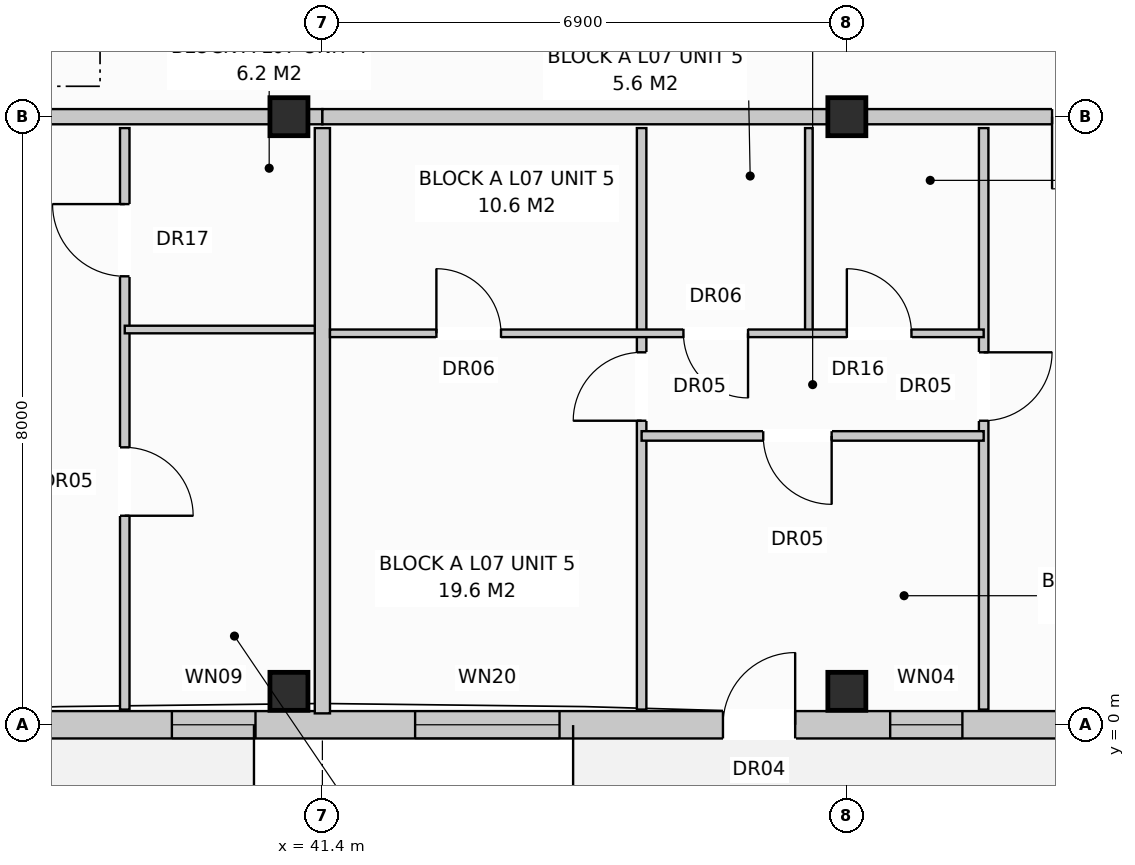
"""IFC4 building model, lengths in metres.
Left out: names, types, materials, properties, quantities, classifications, styles, units other than length and angle.
Written with IfcOpenShell. Run it as: python <this file> out.ifc"""

import sys

from ifc_helpers import new_model, si_unit, direction, frame, frame_2d, origin, origin_with_axes, origin_2d, place, context, subcontext, project, spatial, rectangle, extrude, element, fill, save


model = new_model("IFC4")
c1 = context("Model", 3, precision=1e-05, world=origin(), true_north=direction((0.0, 1.0)))
c2 = subcontext(c1, "Body", "Model", "MODEL_VIEW")
j1 = project(units=[si_unit("LENGTHUNIT", "METRE"), si_unit("PLANEANGLEUNIT", "RADIAN")], contexts=[c1])
p1 = place(None, origin())
s1 = spatial("IfcSite", under=j1, at=p1, CompositionType="ELEMENT")
p2 = place(p1, origin())
s2 = spatial("IfcBuilding", under=s1, at=p2, CompositionType="ELEMENT")
p3 = place(p2, frame((0.0, 0.0, 24.0)))
s3 = spatial("IfcBuildingStorey", under=s2, at=p3, CompositionType="ELEMENT", Elevation=24.0)
for number, where, z_axis, x_axis in (
    (1, (40.96, 0.44, 0.0), (0.0, 0.0, 1.0), (1.0, 0.0, 0.0)),
    (2, (40.96, 8.0, 0.0), (0.0, 0.0, 1.0), (1.0, 0.0, 0.0)),
    (3, (48.3, 0.44, 0.0), (0.0, 0.0, 1.0), (1.0, 0.0, 0.0)),
    (4, (48.3, 8.0, 0.0), (0.0, 0.0, 1.0), (1.0, 0.0, 0.0)),
):
    element("IfcColumn", number, at=place(p3, frame(where, z_axis=z_axis, x_axis=x_axis)), inside=s3, PredefinedType="COLUMN", context=c2, shape_type="SweptSolid", body=[
        extrude(rectangle(XDim=0.5, YDim=0.5, at=origin_2d()), origin(), (0.0, 0.0, 1.0), 3.2),
    ])
p4 = place(p3, frame((0.17, 0.0, 0.0), z_axis=(0.0, 0.0, 1.0), x_axis=(1.0, 0.0, 0.0)))
e5 = element("IfcWall", 5, at=p4, inside=s3, PredefinedType="STANDARD", context=c2, shape_type="SweptSolid", body=[
    extrude(rectangle(XDim=54.86, YDim=0.36, at=frame_2d((27.43, 0.0))), origin(), (0.0, 0.0, 1.0), 2.95),
])
p5 = place(p4, frame((2.5, 0.0, 0.0)))
e6 = element("IfcOpeningElement", 6, at=p5, cuts=e5, PredefinedType="OPENING", context=c2, shape_type="SweptSolid", body=[
    extrude(rectangle(XDim=0.95, YDim=2.1, at=frame_2d((0.475, 1.05))), frame((0.0, 0.192, 0.0), z_axis=(0.0, -1.0, 0.0), x_axis=(1.0, 0.0, 0.0)), (0.0, 0.0, 1.0), 0.384),
])
p6 = place(p4, frame((17.0, 0.0, 0.0)))
e7 = element("IfcOpeningElement", 7, at=p6, cuts=e5, PredefinedType="OPENING", context=c2, shape_type="SweptSolid", body=[
    extrude(rectangle(XDim=0.95, YDim=2.1, at=frame_2d((0.475, 1.05))), frame((0.0, 0.192, 0.0), z_axis=(0.0, -1.0, 0.0), x_axis=(1.0, 0.0, 0.0)), (0.0, 0.0, 1.0), 0.384),
])
p7 = place(p4, frame((30.1, 0.0, 0.0)))
e8 = element("IfcOpeningElement", 8, at=p7, cuts=e5, PredefinedType="OPENING", context=c2, shape_type="SweptSolid", body=[
    extrude(rectangle(XDim=0.95, YDim=2.1, at=frame_2d((0.475, 1.05))), frame((0.0, 0.192, 0.0), z_axis=(0.0, -1.0, 0.0), x_axis=(1.0, 0.0, 0.0)), (0.0, 0.0, 1.0), 0.384),
])
p8 = place(p4, frame((46.5, 0.0, 0.0)))
e9 = element("IfcOpeningElement", 9, at=p8, cuts=e5, PredefinedType="OPENING", context=c2, shape_type="SweptSolid", body=[
    extrude(rectangle(XDim=0.95, YDim=2.1, at=frame_2d((0.475, 1.05))), frame((0.0, 0.192, 0.0), z_axis=(0.0, -1.0, 0.0), x_axis=(1.0, 0.0, 0.0)), (0.0, 0.0, 1.0), 0.384),
])
p9 = place(p4, frame((0.75, 0.0, 0.72)))
e10 = element("IfcOpeningElement", 10, at=p9, cuts=e5, PredefinedType="OPENING", context=c2, shape_type="SweptSolid", body=[
    extrude(rectangle(XDim=1.1, YDim=1.5, at=frame_2d((0.55, 0.75))), frame((0.0, 0.192, 0.0), z_axis=(0.0, -1.0, 0.0), x_axis=(1.0, 0.0, 0.0)), (0.0, 0.0, 1.0), 0.384),
])
p10 = place(p4, frame((4.25, 0.0, 0.72)))
e11 = element("IfcOpeningElement", 11, at=p10, cuts=e5, PredefinedType="OPENING", context=c2, shape_type="SweptSolid", body=[
    extrude(rectangle(XDim=1.9, YDim=1.85, at=frame_2d((0.95, 0.925))), frame((0.0, 0.192, 0.0), z_axis=(0.0, -1.0, 0.0), x_axis=(1.0, 0.0, 0.0)), (0.0, 0.0, 1.0), 0.384),
])
p11 = place(p4, frame((8.925, 0.0, 0.8)))
e12 = element("IfcOpeningElement", 12, at=p11, cuts=e5, PredefinedType="OPENING", context=c2, shape_type="SweptSolid", body=[
    extrude(rectangle(XDim=1.95, YDim=1.65, at=frame_2d((0.975, 0.825))), frame((0.0, 0.192, 0.0), z_axis=(0.0, -1.0, 0.0), x_axis=(1.0, 0.0, 0.0)), (0.0, 0.0, 1.0), 0.384),
])
p12 = place(p4, frame((15.05, 0.0, 0.72)))
e13 = element("IfcOpeningElement", 13, at=p12, cuts=e5, PredefinedType="OPENING", context=c2, shape_type="SweptSolid", body=[
    extrude(rectangle(XDim=1.1, YDim=1.5, at=frame_2d((0.55, 0.75))), frame((0.0, 0.192, 0.0), z_axis=(0.0, -1.0, 0.0), x_axis=(1.0, 0.0, 0.0)), (0.0, 0.0, 1.0), 0.384),
])
p13 = place(p4, frame((21.05, 0.0, 0.72)))
e14 = element("IfcOpeningElement", 14, at=p13, cuts=e5, PredefinedType="OPENING", context=c2, shape_type="SweptSolid", body=[
    extrude(rectangle(XDim=1.9, YDim=1.85, at=frame_2d((0.95, 0.925))), frame((0.0, 0.192, 0.0), z_axis=(0.0, -1.0, 0.0), x_axis=(1.0, 0.0, 0.0)), (0.0, 0.0, 1.0), 0.384),
])
p14 = place(p4, frame((24.85, 0.0, 0.72)))
e15 = element("IfcOpeningElement", 15, at=p14, cuts=e5, PredefinedType="OPENING", context=c2, shape_type="SweptSolid", body=[
    extrude(rectangle(XDim=1.1, YDim=1.5, at=frame_2d((0.55, 0.75))), frame((0.0, 0.192, 0.0), z_axis=(0.0, -1.0, 0.0), x_axis=(1.0, 0.0, 0.0)), (0.0, 0.0, 1.0), 0.384),
])
p15 = place(p4, frame((28.35, 0.0, 0.72)))
e16 = element("IfcOpeningElement", 16, at=p15, cuts=e5, PredefinedType="OPENING", context=c2, shape_type="SweptSolid", body=[
    extrude(rectangle(XDim=1.1, YDim=1.5, at=frame_2d((0.55, 0.75))), frame((0.0, 0.192, 0.0), z_axis=(0.0, -1.0, 0.0), x_axis=(1.0, 0.0, 0.0)), (0.0, 0.0, 1.0), 0.384),
])
p16 = place(p4, frame((31.85, 0.0, 0.72)))
e17 = element("IfcOpeningElement", 17, at=p16, cuts=e5, PredefinedType="OPENING", context=c2, shape_type="SweptSolid", body=[
    extrude(rectangle(XDim=1.9, YDim=1.85, at=frame_2d((0.95, 0.925))), frame((0.0, 0.192, 0.0), z_axis=(0.0, -1.0, 0.0), x_axis=(1.0, 0.0, 0.0)), (0.0, 0.0, 1.0), 0.384),
])
p17 = place(p4, frame((35.525, 0.0, 0.8)))
e18 = element("IfcOpeningElement", 18, at=p17, cuts=e5, PredefinedType="OPENING", context=c2, shape_type="SweptSolid", body=[
    extrude(rectangle(XDim=1.95, YDim=1.65, at=frame_2d((0.975, 0.825))), frame((0.0, 0.192, 0.0), z_axis=(0.0, -1.0, 0.0), x_axis=(1.0, 0.0, 0.0)), (0.0, 0.0, 1.0), 0.384),
])
p18 = place(p4, frame((39.25, 0.0, 0.72)))
e19 = element("IfcOpeningElement", 19, at=p18, cuts=e5, PredefinedType="OPENING", context=c2, shape_type="SweptSolid", body=[
    extrude(rectangle(XDim=1.1, YDim=1.5, at=frame_2d((0.55, 0.75))), frame((0.0, 0.192, 0.0), z_axis=(0.0, -1.0, 0.0), x_axis=(1.0, 0.0, 0.0)), (0.0, 0.0, 1.0), 0.384),
])
p19 = place(p4, frame((42.45, 0.0, 0.8)))
e20 = element("IfcOpeningElement", 20, at=p19, cuts=e5, PredefinedType="OPENING", context=c2, shape_type="SweptSolid", body=[
    extrude(rectangle(XDim=1.9, YDim=1.85, at=frame_2d((0.95, 0.925))), frame((0.0, 0.192, 0.0), z_axis=(0.0, -1.0, 0.0), x_axis=(1.0, 0.0, 0.0)), (0.0, 0.0, 1.0), 0.384),
])
p20 = place(p4, frame((48.7, 0.0, 0.9)))
e21 = element("IfcOpeningElement", 21, at=p20, cuts=e5, PredefinedType="OPENING", context=c2, shape_type="SweptSolid", body=[
    extrude(rectangle(XDim=0.95, YDim=1.55, at=frame_2d((0.475, 0.775))), frame((0.0, 0.192, 0.0), z_axis=(0.0, -1.0, 0.0), x_axis=(1.0, 0.0, 0.0)), (0.0, 0.0, 1.0), 0.384),
])
p21 = place(p4, frame((51.5, 0.0, 0.8)))
e22 = element("IfcOpeningElement", 22, at=p21, cuts=e5, PredefinedType="OPENING", context=c2, shape_type="SweptSolid", body=[
    extrude(rectangle(XDim=1.8, YDim=1.7, at=frame_2d((0.9, 0.85))), frame((0.0, 0.192, 0.0), z_axis=(0.0, -1.0, 0.0), x_axis=(1.0, 0.0, 0.0)), (0.0, 0.0, 1.0), 0.384),
])
p22 = place(p3, frame((41.4, 7.85, 0.0), z_axis=(0.0, 0.0, 1.0), x_axis=(0.0, -1.0, 0.0)))
e23 = element("IfcWall", 23, at=p22, inside=s3, PredefinedType="PARTITIONING", context=c2, shape_type="SweptSolid", body=[
    extrude(rectangle(XDim=7.7, YDim=0.2, at=frame_2d((3.85, 0.0))), origin(), (0.0, 0.0, 1.0), 2.95),
])
p23 = place(p3, frame((34.5, 8.0, 0.0), z_axis=(0.0, 0.0, 1.0), x_axis=(1.0, 0.0, 0.0)))
e24 = element("IfcWall", 24, at=p23, inside=s3, PredefinedType="PARTITIONING", context=c2, shape_type="SweptSolid", body=[
    extrude(rectangle(XDim=6.9, YDim=0.2, at=frame_2d((3.45, 0.0))), origin(), (0.0, 0.0, 1.0), 2.39),
])
p24 = place(p23, frame((2.0, 0.0, 0.0)))
e25 = element("IfcOpeningElement", 25, at=p24, cuts=e24, PredefinedType="OPENING", context=c2, shape_type="SweptSolid", body=[
    extrude(rectangle(XDim=0.95, YDim=2.15, at=frame_2d((0.475, 1.075))), frame((0.0, 0.112, 0.0), z_axis=(0.0, -1.0, 0.0), x_axis=(1.0, 0.0, 0.0)), (0.0, 0.0, 1.0), 0.224),
])
p25 = place(p3, frame((38.8, 7.85, 0.0), z_axis=(0.0, 0.0, 1.0), x_axis=(0.0, -1.0, 0.0)))
e26 = element("IfcWall", 26, at=p25, inside=s3, PredefinedType="PARTITIONING", context=c2, shape_type="SweptSolid", body=[
    extrude(rectangle(XDim=7.65, YDim=0.125, at=frame_2d((3.825, 0.0))), origin(), (0.0, 0.0, 1.0), 2.95),
])
p26 = place(p25, frame((1.0, 0.0, 0.0)))
e27 = element("IfcOpeningElement", 27, at=p26, cuts=e26, PredefinedType="OPENING", context=c2, shape_type="SweptSolid", body=[
    extrude(rectangle(XDim=0.95, YDim=2.1, at=frame_2d((0.475, 1.05))), frame((0.0, 0.074, 0.0), z_axis=(0.0, -1.0, 0.0), x_axis=(1.0, 0.0, 0.0)), (0.0, 0.0, 1.0), 0.149),
])
p27 = place(p25, frame((4.2, 0.0, 0.0)))
e28 = element("IfcOpeningElement", 28, at=p27, cuts=e26, PredefinedType="OPENING", context=c2, shape_type="SweptSolid", body=[
    extrude(rectangle(XDim=0.9, YDim=2.1, at=frame_2d((0.45, 1.05))), frame((0.0, 0.074, 0.0), z_axis=(0.0, -1.0, 0.0), x_axis=(1.0, 0.0, 0.0)), (0.0, 0.0, 1.0), 0.149),
])
p28 = place(p3, frame((38.8, 5.2, 0.0), z_axis=(0.0, 0.0, 1.0), x_axis=(1.0, 0.0, 0.0)))
e29 = element("IfcWall", 29, at=p28, inside=s3, PredefinedType="PARTITIONING", context=c2, shape_type="SweptSolid", body=[
    extrude(rectangle(XDim=2.5, YDim=0.1, at=frame_2d((1.25, 0.0))), origin(), (0.0, 0.0, 1.0), 2.95),
])
p29 = place(p3, frame((41.4, 8.0, 0.0), z_axis=(0.0, 0.0, 1.0), x_axis=(1.0, 0.0, 0.0)))
e30 = element("IfcWall", 30, at=p29, inside=s3, PredefinedType="PARTITIONING", context=c2, shape_type="SweptSolid", body=[
    extrude(rectangle(XDim=13.8, YDim=0.2, at=frame_2d((6.9, 0.0))), origin(), (0.0, 0.0, 1.0), 2.39),
])
p30 = place(p29, frame((9.6, 0.0, 0.0)))
e31 = element("IfcOpeningElement", 31, at=p30, cuts=e30, PredefinedType="OPENING", context=c2, shape_type="SweptSolid", body=[
    extrude(rectangle(XDim=0.95, YDim=2.15, at=frame_2d((0.475, 1.075))), frame((0.0, 0.112, 0.0), z_axis=(0.0, -1.0, 0.0), x_axis=(1.0, 0.0, 0.0)), (0.0, 0.0, 1.0), 0.224),
])
p31 = place(p3, frame((50.1, 7.85, 0.0), z_axis=(0.0, 0.0, 1.0), x_axis=(0.0, -1.0, 0.0)))
e32 = element("IfcWall", 32, at=p31, inside=s3, PredefinedType="PARTITIONING", context=c2, shape_type="SweptSolid", body=[
    extrude(rectangle(XDim=7.65, YDim=0.125, at=frame_2d((3.825, 0.0))), origin(), (0.0, 0.0, 1.0), 2.95),
])
p32 = place(p31, frame((2.95, 0.0, 0.0)))
e33 = element("IfcOpeningElement", 33, at=p32, cuts=e32, PredefinedType="OPENING", context=c2, shape_type="SweptSolid", body=[
    extrude(rectangle(XDim=0.9, YDim=2.1, at=frame_2d((0.45, 1.05))), frame((0.0, 0.074, 0.0), z_axis=(0.0, -1.0, 0.0), x_axis=(1.0, 0.0, 0.0)), (0.0, 0.0, 1.0), 0.149),
])
p33 = place(p3, frame((45.6, 7.85, 0.0), z_axis=(0.0, 0.0, 1.0), x_axis=(0.0, -1.0, 0.0)))
e34 = element("IfcWall", 34, at=p33, inside=s3, PredefinedType="PARTITIONING", context=c2, shape_type="SweptSolid", body=[
    extrude(rectangle(XDim=7.65, YDim=0.125, at=frame_2d((3.825, 0.0))), origin(), (0.0, 0.0, 1.0), 2.59),
])
p34 = place(p33, frame((2.95, 0.0, 0.0)))
e35 = element("IfcOpeningElement", 35, at=p34, cuts=e34, PredefinedType="OPENING", context=c2, shape_type="SweptSolid", body=[
    extrude(rectangle(XDim=0.9, YDim=2.1, at=frame_2d((0.45, 1.05))), frame((0.0, 0.074, 0.0), z_axis=(0.0, -1.0, 0.0), x_axis=(1.0, 0.0, 0.0)), (0.0, 0.0, 1.0), 0.149),
])
p35 = place(p3, frame((47.8, 7.85, 0.0), z_axis=(0.0, 0.0, 1.0), x_axis=(0.0, -1.0, 0.0)))
e36 = element("IfcWall", 36, at=p35, inside=s3, PredefinedType="PARTITIONING", context=c2, shape_type="SweptSolid", body=[
    extrude(rectangle(XDim=2.7, YDim=0.1, at=frame_2d((1.35, 0.0))), origin(), (0.0, 0.0, 1.0), 2.95),
])
p36 = place(p3, frame((41.5, 5.15, 0.0), z_axis=(0.0, 0.0, 1.0), x_axis=(1.0, 0.0, 0.0)))
e37 = element("IfcWall", 37, at=p36, inside=s3, PredefinedType="PARTITIONING", context=c2, shape_type="SweptSolid", body=[
    extrude(rectangle(XDim=8.6, YDim=0.1, at=frame_2d((4.3, 0.0))), origin(), (0.0, 0.0, 1.0), 2.95),
])
p37 = place(p36, frame((1.4, 0.0, 0.0)))
e38 = element("IfcOpeningElement", 38, at=p37, cuts=e37, PredefinedType="OPENING", context=c2, shape_type="SweptSolid", body=[
    extrude(rectangle(XDim=0.85, YDim=2.05, at=frame_2d((0.425, 1.025))), frame((0.0, 0.062, 0.0), z_axis=(0.0, -1.0, 0.0), x_axis=(1.0, 0.0, 0.0)), (0.0, 0.0, 1.0), 0.124),
])
p38 = place(p36, frame((4.65, 0.0, 0.0)))
e39 = element("IfcOpeningElement", 39, at=p38, cuts=e37, PredefinedType="OPENING", context=c2, shape_type="SweptSolid", body=[
    extrude(rectangle(XDim=0.85, YDim=2.05, at=frame_2d((0.425, 1.025))), frame((0.0, 0.062, 0.0), z_axis=(0.0, -1.0, 0.0), x_axis=(1.0, 0.0, 0.0)), (0.0, 0.0, 1.0), 0.124),
])
p39 = place(p36, frame((6.8, 0.0, 0.0)))
e40 = element("IfcOpeningElement", 40, at=p39, cuts=e37, PredefinedType="OPENING", context=c2, shape_type="SweptSolid", body=[
    extrude(rectangle(XDim=0.85, YDim=2.1, at=frame_2d((0.425, 1.05))), frame((0.0, 0.062, 0.0), z_axis=(0.0, -1.0, 0.0), x_axis=(1.0, 0.0, 0.0)), (0.0, 0.0, 1.0), 0.124),
])
p40 = place(p3, frame((45.6, 3.8, 0.0), z_axis=(0.0, 0.0, 1.0), x_axis=(1.0, 0.0, 0.0)))
e41 = element("IfcWall", 41, at=p40, inside=s3, PredefinedType="PARTITIONING", context=c2, shape_type="SweptSolid", body=[
    extrude(rectangle(XDim=4.5, YDim=0.125, at=frame_2d((2.25, 0.0))), origin(), (0.0, 0.0, 1.0), 2.95),
])
p41 = place(p40, frame((1.6, 0.0, 0.0)))
e42 = element("IfcOpeningElement", 42, at=p41, cuts=e41, PredefinedType="OPENING", context=c2, shape_type="SweptSolid", body=[
    extrude(rectangle(XDim=0.9, YDim=2.1, at=frame_2d((0.45, 1.05))), frame((0.0, 0.074, 0.0), z_axis=(0.0, -1.0, 0.0), x_axis=(1.0, 0.0, 0.0)), (0.0, 0.0, 1.0), 0.149),
])
p42 = place(p8, origin_with_axes())
e43 = element("IfcDoor", 43, at=p42, inside=s3, OperationType="SINGLE_SWING_RIGHT", PredefinedType="DOOR", context=c2, shape_type="SweptSolid", body=[
    extrude(rectangle(XDim=0.95, YDim=2.1, at=frame_2d((0.475, 1.05))), frame((0.0, 0.025, 0.0), z_axis=(0.0, -1.0, 0.0), x_axis=(1.0, 0.0, 0.0)), (0.0, 0.0, 1.0), 0.05),
])
fill(e9, e43)
p43 = place(p18, origin_with_axes())
e44 = element("IfcWindow", 44, at=p43, inside=s3, PartitioningType="SINGLE_PANEL", PredefinedType="WINDOW", context=c2, shape_type="SweptSolid", body=[
    extrude(rectangle(XDim=1.1, YDim=1.5, at=frame_2d((0.55, 0.75))), frame((0.0, 0.03, 0.0), z_axis=(0.0, -1.0, 0.0), x_axis=(1.0, 0.0, 0.0)), (0.0, 0.0, 1.0), 0.06),
])
fill(e19, e44)
p44 = place(p19, origin_with_axes())
e45 = element("IfcWindow", 45, at=p44, inside=s3, PartitioningType="SINGLE_PANEL", PredefinedType="WINDOW", context=c2, shape_type="SweptSolid", body=[
    extrude(rectangle(XDim=1.9, YDim=1.85, at=frame_2d((0.95, 0.925))), frame((0.0, 0.03, 0.0), z_axis=(0.0, -1.0, 0.0), x_axis=(1.0, 0.0, 0.0)), (0.0, 0.0, 1.0), 0.06),
])
fill(e20, e45)
p45 = place(p20, origin_with_axes())
e46 = element("IfcWindow", 46, at=p45, inside=s3, PartitioningType="SINGLE_PANEL", PredefinedType="WINDOW", context=c2, shape_type="SweptSolid", body=[
    extrude(rectangle(XDim=0.95, YDim=1.55, at=frame_2d((0.475, 0.775))), frame((0.0, 0.03, 0.0), z_axis=(0.0, -1.0, 0.0), x_axis=(1.0, 0.0, 0.0)), (0.0, 0.0, 1.0), 0.06),
])
fill(e21, e46)
p46 = place(p26, frame((0.95, 0.0, 0.0), z_axis=(0.0, 0.0, 1.0), x_axis=(-1.0, 0.0, 0.0)))
e47 = element("IfcDoor", 47, at=p46, inside=s3, OperationType="SINGLE_SWING_LEFT", PredefinedType="DOOR", context=c2, shape_type="SweptSolid", body=[
    extrude(rectangle(XDim=0.95, YDim=2.1, at=frame_2d((0.475, 1.05))), frame((0.0, 0.025, 0.0), z_axis=(0.0, -1.0, 0.0), x_axis=(1.0, 0.0, 0.0)), (0.0, 0.0, 1.0), 0.05),
])
fill(e27, e47)
p47 = place(p27, origin_with_axes())
e48 = element("IfcDoor", 48, at=p47, inside=s3, OperationType="SINGLE_SWING_RIGHT", PredefinedType="DOOR", context=c2, shape_type="SweptSolid", body=[
    extrude(rectangle(XDim=0.9, YDim=2.1, at=frame_2d((0.45, 1.05))), frame((0.0, 0.025, 0.0), z_axis=(0.0, -1.0, 0.0), x_axis=(1.0, 0.0, 0.0)), (0.0, 0.0, 1.0), 0.05),
])
fill(e28, e48)
p48 = place(p30, frame((0.95, 0.0, 0.0), z_axis=(0.0, 0.0, 1.0), x_axis=(-1.0, 0.0, 0.0)))
e49 = element("IfcDoor", 49, at=p48, inside=s3, OperationType="SINGLE_SWING_LEFT", PredefinedType="DOOR", context=c2, shape_type="SweptSolid", body=[
    extrude(rectangle(XDim=0.95, YDim=2.15, at=frame_2d((0.475, 1.075))), frame((0.0, 0.025, 0.0), z_axis=(0.0, -1.0, 0.0), x_axis=(1.0, 0.0, 0.0)), (0.0, 0.0, 1.0), 0.05),
])
fill(e31, e49)
p49 = place(p32, origin_with_axes())
e50 = element("IfcDoor", 50, at=p49, inside=s3, OperationType="SINGLE_SWING_LEFT", PredefinedType="DOOR", context=c2, shape_type="SweptSolid", body=[
    extrude(rectangle(XDim=0.9, YDim=2.1, at=frame_2d((0.45, 1.05))), frame((0.0, 0.025, 0.0), z_axis=(0.0, -1.0, 0.0), x_axis=(1.0, 0.0, 0.0)), (0.0, 0.0, 1.0), 0.05),
])
fill(e33, e50)
p50 = place(p34, frame((0.9, 0.0, 0.0), z_axis=(0.0, 0.0, 1.0), x_axis=(-1.0, 0.0, 0.0)))
e51 = element("IfcDoor", 51, at=p50, inside=s3, OperationType="SINGLE_SWING_RIGHT", PredefinedType="DOOR", context=c2, shape_type="SweptSolid", body=[
    extrude(rectangle(XDim=0.9, YDim=2.1, at=frame_2d((0.45, 1.05))), frame((0.0, 0.025, 0.0), z_axis=(0.0, -1.0, 0.0), x_axis=(1.0, 0.0, 0.0)), (0.0, 0.0, 1.0), 0.05),
])
fill(e35, e51)
p51 = place(p37, origin_with_axes())
e52 = element("IfcDoor", 52, at=p51, inside=s3, OperationType="SINGLE_SWING_LEFT", PredefinedType="DOOR", context=c2, shape_type="SweptSolid", body=[
    extrude(rectangle(XDim=0.85, YDim=2.05, at=frame_2d((0.425, 1.025))), frame((0.0, 0.025, 0.0), z_axis=(0.0, -1.0, 0.0), x_axis=(1.0, 0.0, 0.0)), (0.0, 0.0, 1.0), 0.05),
])
fill(e38, e52)
p52 = place(p38, frame((0.85, 0.0, 0.0), z_axis=(0.0, 0.0, 1.0), x_axis=(-1.0, 0.0, 0.0)))
e53 = element("IfcDoor", 53, at=p52, inside=s3, OperationType="SINGLE_SWING_RIGHT", PredefinedType="DOOR", context=c2, shape_type="SweptSolid", body=[
    extrude(rectangle(XDim=0.85, YDim=2.05, at=frame_2d((0.425, 1.025))), frame((0.0, 0.025, 0.0), z_axis=(0.0, -1.0, 0.0), x_axis=(1.0, 0.0, 0.0)), (0.0, 0.0, 1.0), 0.05),
])
fill(e39, e53)
p53 = place(p39, origin_with_axes())
e54 = element("IfcDoor", 54, at=p53, inside=s3, OperationType="SINGLE_SWING_LEFT", PredefinedType="DOOR", context=c2, shape_type="SweptSolid", body=[
    extrude(rectangle(XDim=0.85, YDim=2.1, at=frame_2d((0.425, 1.05))), frame((0.0, 0.025, 0.0), z_axis=(0.0, -1.0, 0.0), x_axis=(1.0, 0.0, 0.0)), (0.0, 0.0, 1.0), 0.05),
])
fill(e40, e54)
p54 = place(p41, frame((0.9, 0.0, 0.0), z_axis=(0.0, 0.0, 1.0), x_axis=(-1.0, 0.0, 0.0)))
e55 = element("IfcDoor", 55, at=p54, inside=s3, OperationType="SINGLE_SWING_RIGHT", PredefinedType="DOOR", context=c2, shape_type="SweptSolid", body=[
    extrude(rectangle(XDim=0.9, YDim=2.1, at=frame_2d((0.45, 1.05))), frame((0.0, 0.025, 0.0), z_axis=(0.0, -1.0, 0.0), x_axis=(1.0, 0.0, 0.0)), (0.0, 0.0, 1.0), 0.05),
])
fill(e42, e55)
save(model, sys.argv[1])
